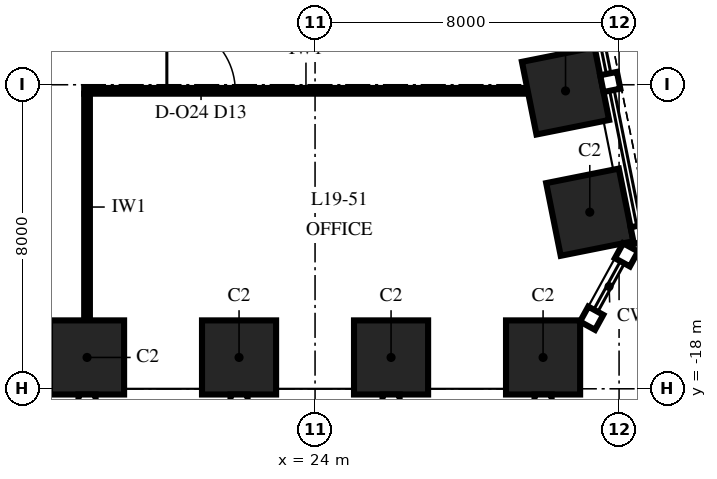
"""IFC4 building model, lengths in metres.
Left out: names, types, materials, properties, quantities, classifications, styles, units other than length and angle.
Written with IfcOpenShell. Run it as: python <this file> out.ifc"""

import sys

from ifc_helpers import new_model, si_unit, direction, frame, frame_2d, origin, origin_2d, place, context, subcontext, project, spatial, rectangle, extrude, element, fill, save


model = new_model("IFC4")
c1 = context("Model", 3, precision=1e-05, world=origin(), true_north=direction((0.0, 1.0)))
c2 = subcontext(c1, "Body", "Model", "MODEL_VIEW")
j1 = project(units=[si_unit("LENGTHUNIT", "METRE"), si_unit("PLANEANGLEUNIT", "RADIAN")], contexts=[c1])
p1 = place(None, origin())
s1 = spatial("IfcSite", under=j1, at=p1, CompositionType="ELEMENT")
p2 = place(p1, origin())
s2 = spatial("IfcBuilding", under=s1, at=p2, CompositionType="ELEMENT")
p3 = place(p2, frame((0.0, 0.0, 88.0)))
s3 = spatial("IfcBuildingStorey", under=s2, at=p3, CompositionType="ELEMENT", Elevation=88.0)
for number, where, z_axis, x_axis in (
    (1, (18.0, -17.175, 0.0), (0.0, 0.0, 1.0), (1.0, 0.0, 0.0)),
    (2, (22.0, -17.175, 0.0), (0.0, 0.0, 1.0), (1.0, 0.0, 0.0)),
    (3, (26.0, -17.175, 0.0), (0.0, 0.0, 1.0), (1.0, 0.0, 0.0)),
    (4, (30.0, -17.175, 0.0), (0.0, 0.0, 1.0), (1.0, 0.0, 0.0)),
    (5, (31.229, -13.353, 0.0), (0.0, 0.0, 1.0), (-0.196, 0.981, 0.0)),
    (6, (30.591, -10.162, 0.0), (0.0, 0.0, 1.0), (-0.196, 0.981, 0.0)),
):
    element("IfcColumn", number, at=place(p3, frame(where, z_axis=z_axis, x_axis=x_axis)), inside=s3, PredefinedType="COLUMN", context=c2, shape_type="SweptSolid", body=[
        extrude(rectangle(XDim=1.95, YDim=1.95, at=origin_2d()), origin(), (0.0, 0.0, 1.0), 4.0),
    ])
p4 = place(p3, frame((17.925, -10.16, 0.0), z_axis=(0.0, 0.0, 1.0), x_axis=(1.0, 0.0, 0.0)))
e7 = element("IfcWall", 7, at=p4, inside=s3, PredefinedType="PARTITIONING", context=c2, shape_type="SweptSolid", body=[
    extrude(rectangle(XDim=11.671, YDim=0.15, at=frame_2d((5.836, 0.0))), origin(), (0.0, 0.0, 1.0), 3.13),
])
p5 = place(p4, frame((2.175, 0.0, 0.0)))
e8 = element("IfcOpeningElement", 8, at=p5, cuts=e7, PredefinedType="OPENING", context=c2, shape_type="SweptSolid", body=[
    extrude(rectangle(XDim=1.8, YDim=2.4, at=frame_2d((0.9, 1.2))), frame((0.0, 0.09, 0.0), z_axis=(0.0, -1.0, 0.0), x_axis=(1.0, 0.0, 0.0)), (0.0, 0.0, 1.0), 0.18),
])
p6 = place(p3, frame((18.0, -16.2, 0.0), z_axis=(0.0, 0.0, 1.0), x_axis=(0.0, 1.0, 0.0)))
e9 = element("IfcWall", 9, at=p6, inside=s3, PredefinedType="PARTITIONING", context=c2, shape_type="SweptSolid", body=[
    extrude(rectangle(XDim=5.965, YDim=0.15, at=frame_2d((2.982, 0.0))), origin(), (0.0, 0.0, 1.0), 3.13),
])
p7 = place(p5, origin())
e10 = element("IfcDoor", 10, at=p7, inside=s3, OperationType="DOUBLE_DOOR_SINGLE_SWING", PredefinedType="DOOR", context=c2, shape_type="SweptSolid", body=[
    extrude(rectangle(XDim=1.8, YDim=2.4, at=frame_2d((0.9, 1.2))), frame((0.0, 0.075, 0.0), z_axis=(0.0, -1.0, 0.0), x_axis=(1.0, 0.0, 0.0)), (0.0, 0.0, 1.0), 0.149),
])
fill(e8, e10)
save(model, sys.argv[1])
